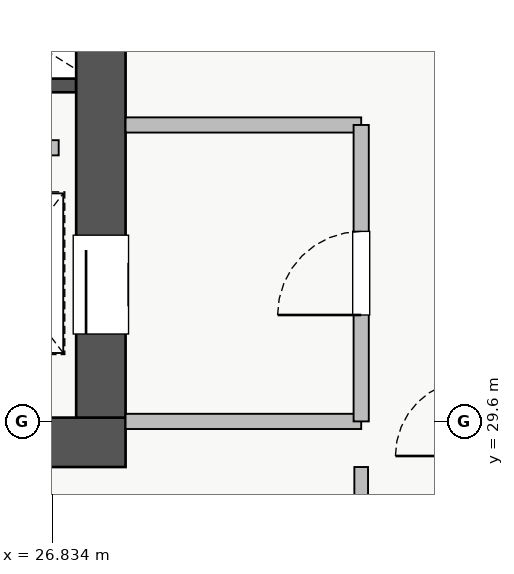
"""IFC4 building model, lengths in metres.
Left out: names, types, materials, properties, quantities, classifications, styles, units other than length and angle.
Written with IfcOpenShell. Run it as: python <this file> out.ifc"""

import sys

from ifc_helpers import new_model, si_unit, direction, frame, frame_2d, origin, place, context, subcontext, project, spatial, rectangle, extrude, source, transform, mapped, element, fill, save


model = new_model("IFC4")
c1 = context("Model", 3, precision=1e-05, world=origin(), true_north=direction((0.0, 1.0)))
c2 = subcontext(c1, "Body", "Model", "MODEL_VIEW")
j1 = project(units=[si_unit("LENGTHUNIT", "METRE"), si_unit("PLANEANGLEUNIT", "RADIAN")], contexts=[c1])
p1 = place(None, origin())
s1 = spatial("IfcSite", under=j1, at=p1, CompositionType="ELEMENT")
p2 = place(p1, origin())
s2 = spatial("IfcBuilding", under=s1, at=p2, CompositionType="ELEMENT")
p3 = place(p2, frame((0.0, 0.0, 179.5)))
s3 = spatial("IfcBuildingStorey", under=s2, at=p3, CompositionType="ELEMENT", Elevation=179.5)
p4 = place(p3, frame((25.8, 34.02, 0.0), z_axis=(0.0, 0.0, 1.0), x_axis=(1.0, 0.0, 0.0)))
e1 = element("IfcWall", 1, at=p4, inside=s3, PredefinedType="SHEAR", context=c2, shape_type="SweptSolid", body=[
    extrude(rectangle(XDim=1.35, YDim=0.18, at=frame_2d((0.675, 0.0))), origin(), (0.0, 0.0, 1.0), 3.07),
])
p5 = place(p3, frame((10.2, 29.325, 0.0), z_axis=(0.0, 0.0, 1.0), x_axis=(1.0, 0.0, 0.0)))
e2 = element("IfcWall", 2, at=p5, inside=s3, PredefinedType="SHEAR", context=c2, shape_type="SweptSolid", body=[
    extrude(rectangle(XDim=17.6, YDim=0.65, at=frame_2d((8.8, 0.0))), origin(), (0.0, 0.0, 1.0), 3.25),
])
p6 = place(p3, frame((27.475, 29.65, 0.0), z_axis=(0.0, 0.0, 1.0), x_axis=(0.0, 1.0, 0.0)))
e3 = element("IfcWall", 3, at=p6, inside=s3, PredefinedType="SHEAR", context=c2, shape_type="SweptSolid", body=[
    extrude(rectangle(XDim=5.9, YDim=0.65, at=frame_2d((2.95, 0.0))), origin(), (0.0, 0.0, 1.0), 3.25),
])
p7 = place(p6, frame((1.1, 0.0, 0.0)))
e4 = element("IfcOpeningElement", 4, at=p7, cuts=e3, PredefinedType="OPENING", context=c2, shape_type="SweptSolid", body=[
    extrude(rectangle(XDim=1.3, YDim=2.05, at=frame_2d((0.65, 1.025))), frame((0.0, 0.335, 0.0), z_axis=(0.0, -1.0, 0.0), x_axis=(1.0, 0.0, 0.0)), (0.0, 0.0, 1.0), 0.67),
])
for number, where, z_axis, x_axis in (
    (5, (27.8, 29.6, 0.0), (0.0, 0.0, 1.0), (1.0, 0.0, 0.0)),
    (6, (27.8, 33.5, 0.0), (0.0, 0.0, 1.0), (1.0, 0.0, 0.0)),
):
    element("IfcWall", number, at=place(p3, frame(where, z_axis=z_axis, x_axis=x_axis)), inside=s3, PredefinedType="PARTITIONING", context=c2, shape_type="SweptSolid", body=[
        extrude(rectangle(XDim=3.1, YDim=0.2, at=frame_2d((1.55, 0.0))), origin(), (0.0, 0.0, 1.0), 3.07),
    ])
p8 = place(p3, frame((30.9, 29.6, 0.0), z_axis=(0.0, 0.0, 1.0), x_axis=(0.0, 1.0, 0.0)))
e7 = element("IfcWall", 7, at=p8, inside=s3, PredefinedType="PARTITIONING", context=c2, shape_type="SweptSolid", body=[
    extrude(rectangle(XDim=3.9, YDim=0.2, at=frame_2d((1.95, 0.0))), origin(), (0.0, 0.0, 1.0), 3.07),
])
p9 = place(p8, frame((1.4, 0.0, 0.0)))
e8 = element("IfcOpeningElement", 8, at=p9, cuts=e7, PredefinedType="OPENING", context=c2, shape_type="SweptSolid", body=[
    extrude(rectangle(XDim=1.1, YDim=2.05, at=frame_2d((0.55, 1.025))), frame((0.0, 0.11, 0.0), z_axis=(0.0, -1.0, 0.0), x_axis=(1.0, 0.0, 0.0)), (0.0, 0.0, 1.0), 0.22),
])
p10 = place(p3, frame((21.75, 33.2, 0.0), z_axis=(0.0, 0.0, 1.0), x_axis=(1.0, 0.0, 0.0)))
e9 = element("IfcWall", 9, at=p10, inside=s3, PredefinedType="PARTITIONING", context=c2, shape_type="SweptSolid", body=[
    extrude(rectangle(XDim=5.17, YDim=0.2, at=frame_2d((2.585, 0.0))), origin(), (0.0, 0.0, 1.0), 3.07),
])
p11 = place(p3, frame((30.9, 17.0, 0.0), z_axis=(0.0, 0.0, 1.0), x_axis=(0.0, 1.0, 0.0)))
e10 = element("IfcWall", 10, at=p11, inside=s3, PredefinedType="PARTITIONING", context=c2, shape_type="SweptSolid", body=[
    extrude(rectangle(XDim=12.0, YDim=0.18, at=frame_2d((6.0, 0.0))), origin(), (0.0, 0.0, 1.0), 3.07),
])
p12 = place(p11, frame((1.4, 0.0, 0.0)))
e11 = element("IfcOpeningElement", 11, at=p12, cuts=e10, PredefinedType="OPENING", context=c2, shape_type="SweptSolid", body=[
    extrude(rectangle(XDim=1.0, YDim=2.05, at=frame_2d((0.5, 1.025))), frame((0.0, 0.1, 0.0), z_axis=(0.0, -1.0, 0.0), x_axis=(1.0, 0.0, 0.0)), (0.0, 0.0, 1.0), 0.2),
])
p13 = place(p11, frame((5.4, 0.0, 0.0)))
e12 = element("IfcOpeningElement", 12, at=p13, cuts=e10, PredefinedType="OPENING", context=c2, shape_type="SweptSolid", body=[
    extrude(rectangle(XDim=1.0, YDim=2.05, at=frame_2d((0.5, 1.025))), frame((0.0, 0.1, 0.0), z_axis=(0.0, -1.0, 0.0), x_axis=(1.0, 0.0, 0.0)), (0.0, 0.0, 1.0), 0.2),
])
p14 = place(p11, frame((9.4, 0.0, 0.0)))
e13 = element("IfcOpeningElement", 13, at=p14, cuts=e10, PredefinedType="OPENING", context=c2, shape_type="SweptSolid", body=[
    extrude(rectangle(XDim=1.0, YDim=2.05, at=frame_2d((0.5, 1.025))), frame((0.0, 0.1, 0.0), z_axis=(0.0, -1.0, 0.0), x_axis=(1.0, 0.0, 0.0)), (0.0, 0.0, 1.0), 0.2),
])
m1 = source(origin(), c2, "Body", "SweptSolid", [
    extrude(rectangle(XDim=1.3, YDim=2.05, at=frame_2d((0.65, 1.025))), frame((0.0, 0.025, 0.0), z_axis=(0.0, -1.0, 0.0), x_axis=(1.0, 0.0, 0.0)), (0.0, 0.0, 1.0), 0.05),
])
p15 = place(p7, origin())
e14 = element("IfcDoor", 14, at=p15, inside=s3, OperationType="SLIDING_TO_LEFT", PredefinedType="DOOR", context=c2, shape_type="MappedRepresentation", body=[
    mapped(m1, transform((0.0, 0.0, 0.0), x_axis=(1.0, 0.0, 0.0), y_axis=(0.0, 1.0, 0.0), z_axis=(0.0, 0.0, 1.0), scale=1.0)),
])
fill(e4, e14)
m2 = source(origin(), c2, "Body", "SweptSolid", [
    extrude(rectangle(XDim=1.1, YDim=2.05, at=frame_2d((0.55, 1.025))), frame((0.0, 0.025, 0.0), z_axis=(0.0, -1.0, 0.0), x_axis=(1.0, 0.0, 0.0)), (0.0, 0.0, 1.0), 0.05),
])
p16 = place(p9, origin())
e15 = element("IfcDoor", 15, at=p16, inside=s3, OperationType="SINGLE_SWING_LEFT", PredefinedType="DOOR", context=c2, shape_type="MappedRepresentation", body=[
    mapped(m2, transform((0.0, 0.0, 0.0), x_axis=(1.0, 0.0, 0.0), y_axis=(0.0, 1.0, 0.0), z_axis=(0.0, 0.0, 1.0), scale=1.0)),
])
fill(e8, e15)
save(model, sys.argv[1])
